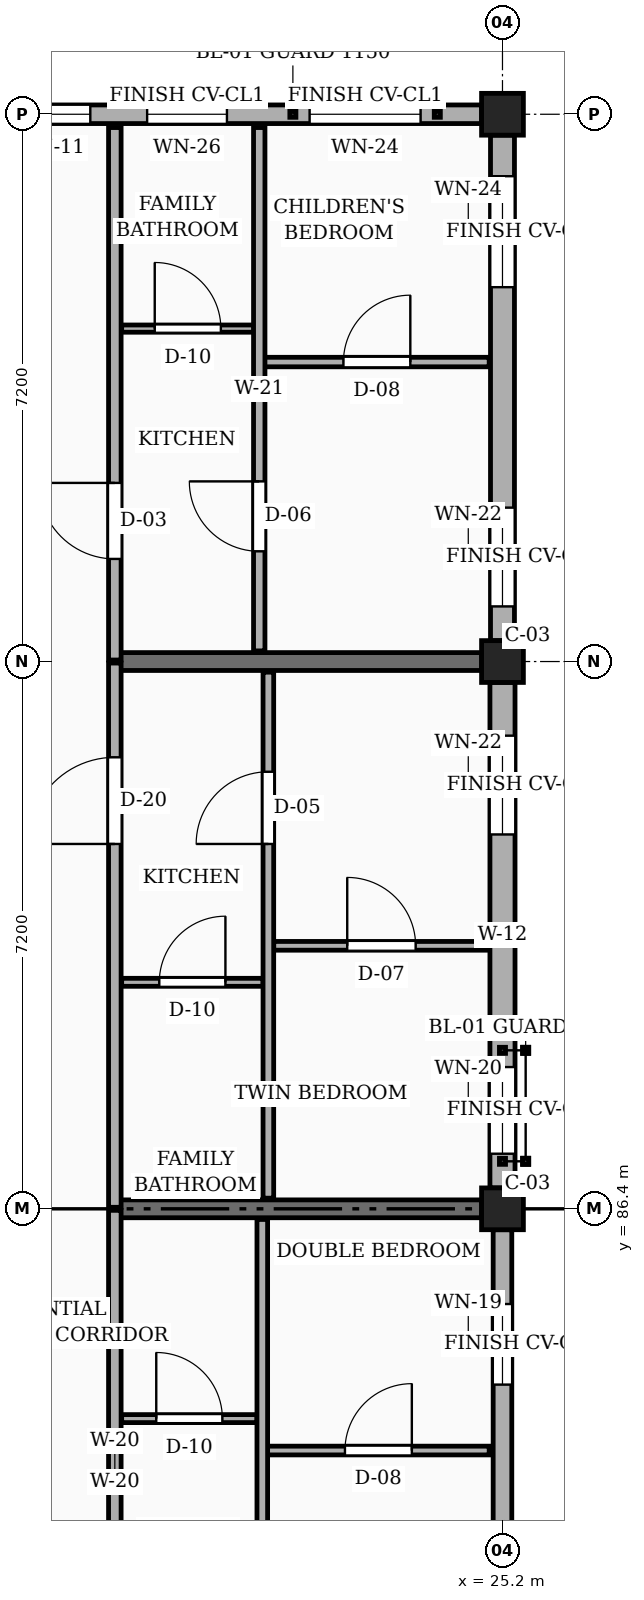
"""IFC4 building model, lengths in metres.
Left out: names, types, materials, properties, quantities, classifications, styles, units other than length and angle.
Written with IfcOpenShell. Run it as: python <this file> out.ifc"""

import sys

from ifc_helpers import new_model, si_unit, direction, frame, frame_2d, origin, origin_2d, place, context, subcontext, project, spatial, rectangle, extrude, element, fill, save


model = new_model("IFC4")
c1 = context("Model", 3, precision=1e-05, world=origin(), true_north=direction((0.0, 1.0)))
c2 = subcontext(c1, "Body", "Model", "MODEL_VIEW")
j1 = project(units=[si_unit("LENGTHUNIT", "METRE"), si_unit("PLANEANGLEUNIT", "RADIAN")], contexts=[c1])
p1 = place(None, origin())
s1 = spatial("IfcSite", under=j1, at=p1, CompositionType="ELEMENT")
p2 = place(p1, origin())
s2 = spatial("IfcBuilding", under=s1, at=p2, CompositionType="ELEMENT")
p3 = place(p2, frame((0.0, 0.0, 13.95)))
s3 = spatial("IfcBuildingStorey", under=s2, at=p3, CompositionType="ELEMENT", Elevation=13.95)
for number, where, z_axis, x_axis in (
    (1, (25.2, 86.4, 0.0), (0.0, 0.0, 1.0), (1.0, 0.0, 0.0)),
    (2, (25.2, 93.6, 0.0), (0.0, 0.0, 1.0), (1.0, 0.0, 0.0)),
    (3, (25.2, 100.8, 0.0), (0.0, 0.0, 1.0), (1.0, 0.0, 0.0)),
):
    element("IfcColumn", number, at=place(p3, frame(where, z_axis=z_axis, x_axis=x_axis)), inside=s3, PredefinedType="COLUMN", context=c2, shape_type="SweptSolid", body=[
        extrude(rectangle(XDim=0.55, YDim=0.55, at=origin_2d()), origin(), (0.0, 0.0, 1.0), 3.15),
    ])
for number, where, z_axis, x_axis in (
    (4, (20.1, 86.4, 0.0), (0.0, 0.0, 1.0), (1.0, 0.0, 0.0)),
    (5, (20.1, 93.6, 0.0), (0.0, 0.0, 1.0), (1.0, 0.0, 0.0)),
):
    element("IfcWall", number, at=place(p3, frame(where, z_axis=z_axis, x_axis=x_axis)), inside=s3, PredefinedType="SOLIDWALL", context=c2, shape_type="SweptSolid", body=[
        extrude(rectangle(XDim=4.825, YDim=0.235, at=frame_2d((2.413, 0.0))), origin(), (0.0, 0.0, 1.0), 2.21),
    ])
p4 = place(p3, frame((25.2, 82.22, 0.0), z_axis=(0.0, 0.0, 1.0), x_axis=(0.0, 1.0, 0.0)))
e6 = element("IfcWall", 6, at=p4, inside=s3, PredefinedType="SOLIDWALL", context=c2, shape_type="SweptSolid", body=[
    extrude(rectangle(XDim=3.905, YDim=0.245, at=frame_2d((1.953, 0.0))), origin(), (0.0, 0.0, 1.0), 2.48),
])
p5 = place(p4, frame((1.867, 0.0, 0.78)))
e7 = element("IfcOpeningElement", 7, at=p5, cuts=e6, PredefinedType="OPENING", context=c2, shape_type="SweptSolid", body=[
    extrude(rectangle(XDim=1.06, YDim=1.36, at=frame_2d((0.53, 0.68))), frame((0.0, 0.133, 0.0), z_axis=(0.0, -1.0, 0.0), x_axis=(1.0, 0.0, 0.0)), (0.0, 0.0, 1.0), 0.265),
])
p6 = place(p3, frame((25.2, 86.675, 0.0), z_axis=(0.0, 0.0, 1.0), x_axis=(0.0, 1.0, 0.0)))
e8 = element("IfcWall", 8, at=p6, inside=s3, PredefinedType="SOLIDWALL", context=c2, shape_type="SweptSolid", body=[
    extrude(rectangle(XDim=6.65, YDim=0.33, at=frame_2d((3.325, 0.0))), origin(), (0.0, 0.0, 1.0), 2.48),
])
p7 = place(p6, frame((0.45, 0.0, 0.78)))
e9 = element("IfcOpeningElement", 9, at=p7, cuts=e8, PredefinedType="OPENING", context=c2, shape_type="SweptSolid", body=[
    extrude(rectangle(XDim=1.14, YDim=1.36, at=frame_2d((0.57, 0.68))), frame((0.0, 0.175, 0.0), z_axis=(0.0, -1.0, 0.0), x_axis=(1.0, 0.0, 0.0)), (0.0, 0.0, 1.0), 0.35),
])
p8 = place(p6, frame((4.65, 0.0, 0.78)))
e10 = element("IfcOpeningElement", 10, at=p8, cuts=e8, PredefinedType="OPENING", context=c2, shape_type="SweptSolid", body=[
    extrude(rectangle(XDim=1.3, YDim=1.36, at=frame_2d((0.65, 0.68))), frame((0.0, 0.175, 0.0), z_axis=(0.0, -1.0, 0.0), x_axis=(1.0, 0.0, 0.0)), (0.0, 0.0, 1.0), 0.35),
])
p9 = place(p3, frame((25.2, 93.875, 0.0), z_axis=(0.0, 0.0, 1.0), x_axis=(0.0, 1.0, 0.0)))
e11 = element("IfcWall", 11, at=p9, inside=s3, PredefinedType="SOLIDWALL", context=c2, shape_type="SweptSolid", body=[
    extrude(rectangle(XDim=6.65, YDim=0.315, at=frame_2d((3.325, 0.0))), origin(), (0.0, 0.0, 1.0), 2.48),
])
p10 = place(p9, frame((0.45, 0.0, 0.78)))
e12 = element("IfcOpeningElement", 12, at=p10, cuts=e11, PredefinedType="OPENING", context=c2, shape_type="SweptSolid", body=[
    extrude(rectangle(XDim=1.3, YDim=1.36, at=frame_2d((0.65, 0.68))), frame((0.0, 0.167, 0.0), z_axis=(0.0, -1.0, 0.0), x_axis=(1.0, 0.0, 0.0)), (0.0, 0.0, 1.0), 0.335),
])
p11 = place(p9, frame((4.65, 0.0, 0.78)))
e13 = element("IfcOpeningElement", 13, at=p11, cuts=e11, PredefinedType="OPENING", context=c2, shape_type="SweptSolid", body=[
    extrude(rectangle(XDim=1.46, YDim=1.36, at=frame_2d((0.73, 0.68))), frame((0.0, 0.167, 0.0), z_axis=(0.0, -1.0, 0.0), x_axis=(1.0, 0.0, 0.0)), (0.0, 0.0, 1.0), 0.335),
])
p12 = place(p3, frame((24.925, 100.8, 0.0), z_axis=(0.0, 0.0, 1.0), x_axis=(-1.0, 0.0, 0.0)))
e14 = element("IfcWall", 14, at=p12, inside=s3, PredefinedType="SOLIDWALL", context=c2, shape_type="SweptSolid", body=[
    extrude(rectangle(XDim=6.65, YDim=0.245, at=frame_2d((3.325, 0.0))), origin(), (0.0, 0.0, 1.0), 2.48),
])
p13 = place(p12, frame((0.802, 0.0, 0.78)))
e15 = element("IfcOpeningElement", 15, at=p13, cuts=e14, PredefinedType="OPENING", context=c2, shape_type="SweptSolid", body=[
    extrude(rectangle(XDim=1.46, YDim=1.36, at=frame_2d((0.73, 0.68))), frame((0.0, 0.133, 0.0), z_axis=(0.0, -1.0, 0.0), x_axis=(1.0, 0.0, 0.0)), (0.0, 0.0, 1.0), 0.265),
])
p14 = place(p12, frame((3.35, 0.0, 0.78)))
e16 = element("IfcOpeningElement", 16, at=p14, cuts=e14, PredefinedType="OPENING", context=c2, shape_type="SweptSolid", body=[
    extrude(rectangle(XDim=1.05, YDim=1.44, at=frame_2d((0.525, 0.72))), frame((0.0, 0.133, 0.0), z_axis=(0.0, -1.0, 0.0), x_axis=(1.0, 0.0, 0.0)), (0.0, 0.0, 1.0), 0.265),
])
p15 = place(p12, frame((5.147, 0.0, 0.78)))
e17 = element("IfcOpeningElement", 17, at=p15, cuts=e14, PredefinedType="OPENING", context=c2, shape_type="SweptSolid", body=[
    extrude(rectangle(XDim=1.04, YDim=1.26, at=frame_2d((0.52, 0.63))), frame((0.0, 0.133, 0.0), z_axis=(0.0, -1.0, 0.0), x_axis=(1.0, 0.0, 0.0)), (0.0, 0.0, 1.0), 0.265),
])
p16 = place(p3, frame((20.1, 79.22, 0.0), z_axis=(0.0, 0.0, 1.0), x_axis=(0.0, 1.0, 0.0)))
e18 = element("IfcWall", 18, at=p16, inside=s3, PredefinedType="PARTITIONING", context=c2, shape_type="SweptSolid", body=[
    extrude(rectangle(XDim=7.16, YDim=0.165, at=frame_2d((3.58, 0.0))), origin(), (0.0, 0.0, 1.0), 2.345),
])
p17 = place(p16, frame((1.33, 0.0, 0.0)))
e19 = element("IfcOpeningElement", 19, at=p17, cuts=e18, PredefinedType="OPENING", context=c2, shape_type="SweptSolid", body=[
    extrude(rectangle(XDim=0.94, YDim=2.12, at=frame_2d((0.47, 1.06))), frame((0.0, 0.093, 0.0), z_axis=(0.0, -1.0, 0.0), x_axis=(1.0, 0.0, 0.0)), (0.0, 0.0, 1.0), 0.185),
])
p18 = place(p3, frame((20.1, 86.42, 0.0), z_axis=(0.0, 0.0, 1.0), x_axis=(0.0, 1.0, 0.0)))
e20 = element("IfcWall", 20, at=p18, inside=s3, PredefinedType="PARTITIONING", context=c2, shape_type="SweptSolid", body=[
    extrude(rectangle(XDim=7.16, YDim=0.165, at=frame_2d((3.58, 0.0))), origin(), (0.0, 0.0, 1.0), 2.345),
])
p19 = place(p18, frame((4.78, 0.0, 0.0)))
e21 = element("IfcOpeningElement", 21, at=p19, cuts=e20, PredefinedType="OPENING", context=c2, shape_type="SweptSolid", body=[
    extrude(rectangle(XDim=1.14, YDim=2.18, at=frame_2d((0.57, 1.09))), frame((0.0, 0.093, 0.0), z_axis=(0.0, -1.0, 0.0), x_axis=(1.0, 0.0, 0.0)), (0.0, 0.0, 1.0), 0.185),
])
p20 = place(p3, frame((20.1, 93.62, 0.0), z_axis=(0.0, 0.0, 1.0), x_axis=(0.0, 1.0, 0.0)))
e22 = element("IfcWall", 22, at=p20, inside=s3, PredefinedType="PARTITIONING", context=c2, shape_type="SweptSolid", body=[
    extrude(rectangle(XDim=7.005, YDim=0.165, at=frame_2d((3.502, 0.0))), origin(), (0.0, 0.0, 1.0), 2.345),
])
p21 = place(p20, frame((1.33, 0.0, 0.0)))
e23 = element("IfcOpeningElement", 23, at=p21, cuts=e22, PredefinedType="OPENING", context=c2, shape_type="SweptSolid", body=[
    extrude(rectangle(XDim=1.0, YDim=2.15, at=frame_2d((0.5, 1.075))), frame((0.0, 0.093, 0.0), z_axis=(0.0, -1.0, 0.0), x_axis=(1.0, 0.0, 0.0)), (0.0, 0.0, 1.0), 0.185),
])
p22 = place(p3, frame((22.11, 83.22, 0.0), z_axis=(0.0, 0.0, 1.0), x_axis=(1.0, 0.0, 0.0)))
e24 = element("IfcWall", 24, at=p22, inside=s3, PredefinedType="PARTITIONING", context=c2, shape_type="SweptSolid", body=[
    extrude(rectangle(XDim=2.915, YDim=0.115, at=frame_2d((1.458, 0.0))), origin(), (0.0, 0.0, 1.0), 2.345),
])
p23 = place(p22, frame((1.018, 0.0, 0.0)))
e25 = element("IfcOpeningElement", 25, at=p23, cuts=e24, PredefinedType="OPENING", context=c2, shape_type="SweptSolid", body=[
    extrude(rectangle(XDim=0.88, YDim=2.08, at=frame_2d((0.44, 1.04))), frame((0.0, 0.067, 0.0), z_axis=(0.0, -1.0, 0.0), x_axis=(1.0, 0.0, 0.0)), (0.0, 0.0, 1.0), 0.135),
])
p24 = place(p3, frame((20.19, 83.64, 0.0), z_axis=(0.0, 0.0, 1.0), x_axis=(1.0, 0.0, 0.0)))
e26 = element("IfcWall", 26, at=p24, inside=s3, PredefinedType="PARTITIONING", context=c2, shape_type="SweptSolid", body=[
    extrude(rectangle(XDim=1.78, YDim=0.105, at=frame_2d((0.89, 0.0))), origin(), (0.0, 0.0, 1.0), 2.345),
])
p25 = place(p24, frame((0.455, 0.0, 0.0)))
e27 = element("IfcOpeningElement", 27, at=p25, cuts=e26, PredefinedType="OPENING", context=c2, shape_type="SweptSolid", body=[
    extrude(rectangle(XDim=0.87, YDim=2.05, at=frame_2d((0.435, 1.025))), frame((0.0, 0.062, 0.0), z_axis=(0.0, -1.0, 0.0), x_axis=(1.0, 0.0, 0.0)), (0.0, 0.0, 1.0), 0.125),
])
p26 = place(p3, frame((22.04, 79.34, 0.0), z_axis=(0.0, 0.0, 1.0), x_axis=(0.0, 1.0, 0.0)))
e28 = element("IfcWall", 28, at=p26, inside=s3, PredefinedType="PARTITIONING", context=c2, shape_type="SweptSolid", body=[
    extrude(rectangle(XDim=6.92, YDim=0.14, at=frame_2d((3.46, 0.0))), origin(), (0.0, 0.0, 1.0), 2.345),
])
p27 = place(p26, frame((1.31, 0.0, 0.0)))
e29 = element("IfcOpeningElement", 29, at=p27, cuts=e28, PredefinedType="OPENING", context=c2, shape_type="SweptSolid", body=[
    extrude(rectangle(XDim=0.92, YDim=2.1, at=frame_2d((0.46, 1.05))), frame((0.0, 0.08, 0.0), z_axis=(0.0, -1.0, 0.0), x_axis=(1.0, 0.0, 0.0)), (0.0, 0.0, 1.0), 0.16),
])
p28 = place(p3, frame((22.19, 89.86, 0.0), z_axis=(0.0, 0.0, 1.0), x_axis=(1.0, 0.0, 0.0)))
e30 = element("IfcWall", 30, at=p28, inside=s3, PredefinedType="PARTITIONING", context=c2, shape_type="SweptSolid", body=[
    extrude(rectangle(XDim=2.835, YDim=0.115, at=frame_2d((1.417, 0.0))), origin(), (0.0, 0.0, 1.0), 2.345),
])
p29 = place(p28, frame((0.968, 0.0, 0.0)))
e31 = element("IfcOpeningElement", 31, at=p29, cuts=e30, PredefinedType="OPENING", context=c2, shape_type="SweptSolid", body=[
    extrude(rectangle(XDim=0.9, YDim=2.1, at=frame_2d((0.45, 1.05))), frame((0.0, 0.067, 0.0), z_axis=(0.0, -1.0, 0.0), x_axis=(1.0, 0.0, 0.0)), (0.0, 0.0, 1.0), 0.135),
])
p30 = place(p3, frame((20.19, 89.38, 0.0), z_axis=(0.0, 0.0, 1.0), x_axis=(1.0, 0.0, 0.0)))
e32 = element("IfcWall", 32, at=p30, inside=s3, PredefinedType="PARTITIONING", context=c2, shape_type="SweptSolid", body=[
    extrude(rectangle(XDim=1.86, YDim=0.105, at=frame_2d((0.93, 0.0))), origin(), (0.0, 0.0, 1.0), 2.345),
])
p31 = place(p30, frame((0.495, 0.0, 0.0)))
e33 = element("IfcOpeningElement", 33, at=p31, cuts=e32, PredefinedType="OPENING", context=c2, shape_type="SweptSolid", body=[
    extrude(rectangle(XDim=0.87, YDim=2.05, at=frame_2d((0.435, 1.025))), frame((0.0, 0.062, 0.0), z_axis=(0.0, -1.0, 0.0), x_axis=(1.0, 0.0, 0.0)), (0.0, 0.0, 1.0), 0.125),
])
p32 = place(p3, frame((22.12, 86.54, 0.0), z_axis=(0.0, 0.0, 1.0), x_axis=(0.0, 1.0, 0.0)))
e34 = element("IfcWall", 34, at=p32, inside=s3, PredefinedType="PARTITIONING", context=c2, shape_type="SweptSolid", body=[
    extrude(rectangle(XDim=6.92, YDim=0.14, at=frame_2d((3.46, 0.0))), origin(), (0.0, 0.0, 1.0), 2.345),
])
p33 = place(p32, frame((4.66, 0.0, 0.0)))
e35 = element("IfcOpeningElement", 35, at=p33, cuts=e34, PredefinedType="OPENING", context=c2, shape_type="SweptSolid", body=[
    extrude(rectangle(XDim=0.95, YDim=2.1, at=frame_2d((0.475, 1.05))), frame((0.0, 0.08, 0.0), z_axis=(0.0, -1.0, 0.0), x_axis=(1.0, 0.0, 0.0)), (0.0, 0.0, 1.0), 0.16),
])
p34 = place(p3, frame((22.07, 97.54, 0.0), z_axis=(0.0, 0.0, 1.0), x_axis=(1.0, 0.0, 0.0)))
e36 = element("IfcWall", 36, at=p34, inside=s3, PredefinedType="PARTITIONING", context=c2, shape_type="SweptSolid", body=[
    extrude(rectangle(XDim=2.955, YDim=0.125, at=frame_2d((1.478, 0.0))), origin(), (0.0, 0.0, 1.0), 2.345),
])
p35 = place(p34, frame((1.038, 0.0, 0.0)))
e37 = element("IfcOpeningElement", 37, at=p35, cuts=e36, PredefinedType="OPENING", context=c2, shape_type="SweptSolid", body=[
    extrude(rectangle(XDim=0.88, YDim=2.08, at=frame_2d((0.44, 1.04))), frame((0.0, 0.073, 0.0), z_axis=(0.0, -1.0, 0.0), x_axis=(1.0, 0.0, 0.0)), (0.0, 0.0, 1.0), 0.145),
])
p36 = place(p3, frame((20.19, 97.98, 0.0), z_axis=(0.0, 0.0, 1.0), x_axis=(1.0, 0.0, 0.0)))
e38 = element("IfcWall", 38, at=p36, inside=s3, PredefinedType="PARTITIONING", context=c2, shape_type="SweptSolid", body=[
    extrude(rectangle(XDim=1.74, YDim=0.095, at=frame_2d((0.87, 0.0))), origin(), (0.0, 0.0, 1.0), 2.345),
])
p37 = place(p36, frame((0.435, 0.0, 0.0)))
e39 = element("IfcOpeningElement", 39, at=p37, cuts=e38, PredefinedType="OPENING", context=c2, shape_type="SweptSolid", body=[
    extrude(rectangle(XDim=0.87, YDim=2.05, at=frame_2d((0.435, 1.025))), frame((0.0, 0.058, 0.0), z_axis=(0.0, -1.0, 0.0), x_axis=(1.0, 0.0, 0.0)), (0.0, 0.0, 1.0), 0.115),
])
p38 = place(p3, frame((22.0, 93.74, 0.0), z_axis=(0.0, 0.0, 1.0), x_axis=(0.0, 1.0, 0.0)))
e40 = element("IfcWall", 40, at=p38, inside=s3, PredefinedType="PARTITIONING", context=c2, shape_type="SweptSolid", body=[
    extrude(rectangle(XDim=6.885, YDim=0.15, at=frame_2d((3.442, 0.0))), origin(), (0.0, 0.0, 1.0), 2.345),
])
p39 = place(p38, frame((1.31, 0.0, 0.0)))
e41 = element("IfcOpeningElement", 41, at=p39, cuts=e40, PredefinedType="OPENING", context=c2, shape_type="SweptSolid", body=[
    extrude(rectangle(XDim=0.92, YDim=2.1, at=frame_2d((0.46, 1.05))), frame((0.0, 0.085, 0.0), z_axis=(0.0, -1.0, 0.0), x_axis=(1.0, 0.0, 0.0)), (0.0, 0.0, 1.0), 0.17),
])
p40 = place(p5, origin())
e42 = element("IfcWindow", 42, at=p40, inside=s3, PartitioningType="SINGLE_PANEL", PredefinedType="WINDOW", context=c2, shape_type="SweptSolid", body=[
    extrude(rectangle(XDim=1.06, YDim=1.36, at=frame_2d((0.53, 0.68))), frame((0.0, 0.03, 0.0), z_axis=(0.0, -1.0, 0.0), x_axis=(1.0, 0.0, 0.0)), (0.0, 0.0, 1.0), 0.06),
])
fill(e7, e42)
p41 = place(p7, origin())
e43 = element("IfcWindow", 43, at=p41, inside=s3, PartitioningType="SINGLE_PANEL", PredefinedType="WINDOW", context=c2, shape_type="SweptSolid", body=[
    extrude(rectangle(XDim=1.14, YDim=1.36, at=frame_2d((0.57, 0.68))), frame((0.0, 0.03, 0.0), z_axis=(0.0, -1.0, 0.0), x_axis=(1.0, 0.0, 0.0)), (0.0, 0.0, 1.0), 0.06),
])
fill(e9, e43)
p42 = place(p8, origin())
e44 = element("IfcWindow", 44, at=p42, inside=s3, PartitioningType="SINGLE_PANEL", PredefinedType="WINDOW", context=c2, shape_type="SweptSolid", body=[
    extrude(rectangle(XDim=1.3, YDim=1.36, at=frame_2d((0.65, 0.68))), frame((0.0, 0.03, 0.0), z_axis=(0.0, -1.0, 0.0), x_axis=(1.0, 0.0, 0.0)), (0.0, 0.0, 1.0), 0.06),
])
fill(e10, e44)
p43 = place(p10, origin())
e45 = element("IfcWindow", 45, at=p43, inside=s3, PartitioningType="SINGLE_PANEL", PredefinedType="WINDOW", context=c2, shape_type="SweptSolid", body=[
    extrude(rectangle(XDim=1.3, YDim=1.36, at=frame_2d((0.65, 0.68))), frame((0.0, 0.03, 0.0), z_axis=(0.0, -1.0, 0.0), x_axis=(1.0, 0.0, 0.0)), (0.0, 0.0, 1.0), 0.06),
])
fill(e12, e45)
p44 = place(p11, origin())
e46 = element("IfcWindow", 46, at=p44, inside=s3, PartitioningType="SINGLE_PANEL", PredefinedType="WINDOW", context=c2, shape_type="SweptSolid", body=[
    extrude(rectangle(XDim=1.46, YDim=1.36, at=frame_2d((0.73, 0.68))), frame((0.0, 0.03, 0.0), z_axis=(0.0, -1.0, 0.0), x_axis=(1.0, 0.0, 0.0)), (0.0, 0.0, 1.0), 0.06),
])
fill(e13, e46)
p45 = place(p13, origin())
e47 = element("IfcWindow", 47, at=p45, inside=s3, PartitioningType="SINGLE_PANEL", PredefinedType="WINDOW", context=c2, shape_type="SweptSolid", body=[
    extrude(rectangle(XDim=1.46, YDim=1.36, at=frame_2d((0.73, 0.68))), frame((0.0, 0.03, 0.0), z_axis=(0.0, -1.0, 0.0), x_axis=(1.0, 0.0, 0.0)), (0.0, 0.0, 1.0), 0.06),
])
fill(e15, e47)
p46 = place(p14, origin())
e48 = element("IfcWindow", 48, at=p46, inside=s3, PartitioningType="SINGLE_PANEL", PredefinedType="WINDOW", context=c2, shape_type="SweptSolid", body=[
    extrude(rectangle(XDim=1.05, YDim=1.44, at=frame_2d((0.525, 0.72))), frame((0.0, 0.03, 0.0), z_axis=(0.0, -1.0, 0.0), x_axis=(1.0, 0.0, 0.0)), (0.0, 0.0, 1.0), 0.06),
])
fill(e16, e48)
p47 = place(p15, origin())
e49 = element("IfcWindow", 49, at=p47, inside=s3, PartitioningType="SINGLE_PANEL", PredefinedType="WINDOW", context=c2, shape_type="SweptSolid", body=[
    extrude(rectangle(XDim=1.04, YDim=1.26, at=frame_2d((0.52, 0.63))), frame((0.0, 0.03, 0.0), z_axis=(0.0, -1.0, 0.0), x_axis=(1.0, 0.0, 0.0)), (0.0, 0.0, 1.0), 0.06),
])
fill(e17, e49)
p48 = place(p19, origin())
e50 = element("IfcDoor", 50, at=p48, inside=s3, OperationType="SINGLE_SWING_LEFT", PredefinedType="DOOR", context=c2, shape_type="SweptSolid", body=[
    extrude(rectangle(XDim=1.14, YDim=2.18, at=frame_2d((0.57, 1.09))), frame((0.0, 0.025, 0.0), z_axis=(0.0, -1.0, 0.0), x_axis=(1.0, 0.0, 0.0)), (0.0, 0.0, 1.0), 0.05),
])
fill(e21, e50)
p49 = place(p21, origin())
e51 = element("IfcDoor", 51, at=p49, inside=s3, OperationType="SINGLE_SWING_RIGHT", PredefinedType="DOOR", context=c2, shape_type="SweptSolid", body=[
    extrude(rectangle(XDim=1.0, YDim=2.15, at=frame_2d((0.5, 1.075))), frame((0.0, 0.025, 0.0), z_axis=(0.0, -1.0, 0.0), x_axis=(1.0, 0.0, 0.0)), (0.0, 0.0, 1.0), 0.05),
])
fill(e23, e51)
p50 = place(p23, origin())
e52 = element("IfcDoor", 52, at=p50, inside=s3, OperationType="SINGLE_SWING_RIGHT", PredefinedType="DOOR", context=c2, shape_type="SweptSolid", body=[
    extrude(rectangle(XDim=0.88, YDim=2.08, at=frame_2d((0.44, 1.04))), frame((0.0, 0.025, 0.0), z_axis=(0.0, -1.0, 0.0), x_axis=(1.0, 0.0, 0.0)), (0.0, 0.0, 1.0), 0.05),
])
fill(e25, e52)
p51 = place(p25, origin())
e53 = element("IfcDoor", 53, at=p51, inside=s3, OperationType="SINGLE_SWING_LEFT", PredefinedType="DOOR", context=c2, shape_type="SweptSolid", body=[
    extrude(rectangle(XDim=0.87, YDim=2.05, at=frame_2d((0.435, 1.025))), frame((0.0, 0.025, 0.0), z_axis=(0.0, -1.0, 0.0), x_axis=(1.0, 0.0, 0.0)), (0.0, 0.0, 1.0), 0.05),
])
fill(e27, e53)
p52 = place(p29, origin())
e54 = element("IfcDoor", 54, at=p52, inside=s3, OperationType="SINGLE_SWING_LEFT", PredefinedType="DOOR", context=c2, shape_type="SweptSolid", body=[
    extrude(rectangle(XDim=0.9, YDim=2.1, at=frame_2d((0.45, 1.05))), frame((0.0, 0.025, 0.0), z_axis=(0.0, -1.0, 0.0), x_axis=(1.0, 0.0, 0.0)), (0.0, 0.0, 1.0), 0.05),
])
fill(e31, e54)
p53 = place(p31, origin())
e55 = element("IfcDoor", 55, at=p53, inside=s3, OperationType="SINGLE_SWING_RIGHT", PredefinedType="DOOR", context=c2, shape_type="SweptSolid", body=[
    extrude(rectangle(XDim=0.87, YDim=2.05, at=frame_2d((0.435, 1.025))), frame((0.0, 0.025, 0.0), z_axis=(0.0, -1.0, 0.0), x_axis=(1.0, 0.0, 0.0)), (0.0, 0.0, 1.0), 0.05),
])
fill(e33, e55)
p54 = place(p33, origin())
e56 = element("IfcDoor", 56, at=p54, inside=s3, OperationType="SINGLE_SWING_LEFT", PredefinedType="DOOR", context=c2, shape_type="SweptSolid", body=[
    extrude(rectangle(XDim=0.95, YDim=2.1, at=frame_2d((0.475, 1.05))), frame((0.0, 0.025, 0.0), z_axis=(0.0, -1.0, 0.0), x_axis=(1.0, 0.0, 0.0)), (0.0, 0.0, 1.0), 0.05),
])
fill(e35, e56)
p55 = place(p35, origin())
e57 = element("IfcDoor", 57, at=p55, inside=s3, OperationType="SINGLE_SWING_RIGHT", PredefinedType="DOOR", context=c2, shape_type="SweptSolid", body=[
    extrude(rectangle(XDim=0.88, YDim=2.08, at=frame_2d((0.44, 1.04))), frame((0.0, 0.025, 0.0), z_axis=(0.0, -1.0, 0.0), x_axis=(1.0, 0.0, 0.0)), (0.0, 0.0, 1.0), 0.05),
])
fill(e37, e57)
p56 = place(p37, origin())
e58 = element("IfcDoor", 58, at=p56, inside=s3, OperationType="SINGLE_SWING_LEFT", PredefinedType="DOOR", context=c2, shape_type="SweptSolid", body=[
    extrude(rectangle(XDim=0.87, YDim=2.05, at=frame_2d((0.435, 1.025))), frame((0.0, 0.025, 0.0), z_axis=(0.0, -1.0, 0.0), x_axis=(1.0, 0.0, 0.0)), (0.0, 0.0, 1.0), 0.05),
])
fill(e39, e58)
p57 = place(p39, origin())
e59 = element("IfcDoor", 59, at=p57, inside=s3, OperationType="SINGLE_SWING_RIGHT", PredefinedType="DOOR", context=c2, shape_type="SweptSolid", body=[
    extrude(rectangle(XDim=0.92, YDim=2.1, at=frame_2d((0.46, 1.05))), frame((0.0, 0.025, 0.0), z_axis=(0.0, -1.0, 0.0), x_axis=(1.0, 0.0, 0.0)), (0.0, 0.0, 1.0), 0.05),
])
fill(e41, e59)
save(model, sys.argv[1])
